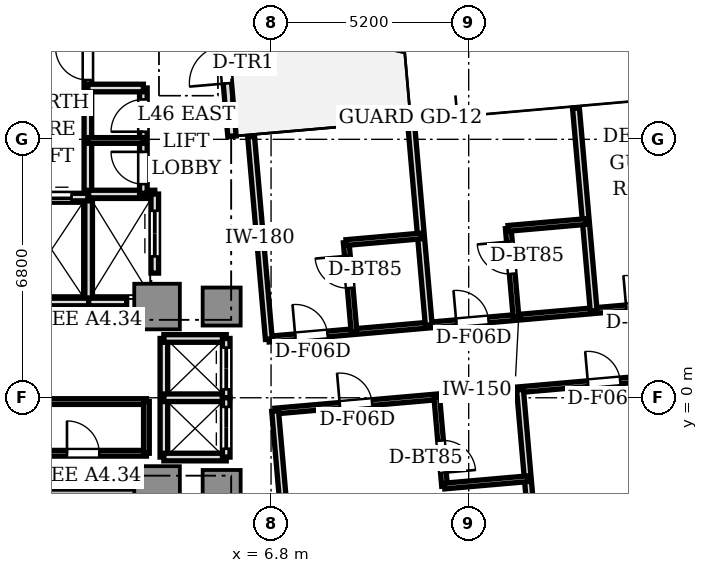
"""IFC4 building model, lengths in metres.
Left out: names, types, materials, properties, quantities, classifications, styles, units other than length and angle.
Written with IfcOpenShell. Run it as: python <this file> out.ifc"""

import sys

from ifc_helpers import new_model, si_unit, direction, frame, frame_2d, origin, origin_2d, place, context, subcontext, project, spatial, rectangle, extrude, source, transform, mapped, element, fill, save


model = new_model("IFC4")
c1 = context("Model", 3, precision=1e-05, world=origin(), true_north=direction((0.0, 1.0)))
c2 = subcontext(c1, "Body", "Model", "MODEL_VIEW")
j1 = project(units=[si_unit("LENGTHUNIT", "METRE"), si_unit("PLANEANGLEUNIT", "RADIAN")], contexts=[c1])
p1 = place(None, origin())
s1 = spatial("IfcSite", under=j1, at=p1, CompositionType="ELEMENT")
p2 = place(p1, origin())
s2 = spatial("IfcBuilding", under=s1, at=p2, CompositionType="ELEMENT")
p3 = place(p2, frame((0.0, 0.0, 167.35)))
s3 = spatial("IfcBuildingStorey", under=s2, at=p3, CompositionType="ELEMENT", Elevation=167.35)
m1 = source(origin(), c2, "Body", "SweptSolid", [
    extrude(rectangle(XDim=1.2, YDim=1.2, at=origin_2d()), origin(), (0.0, 0.0, 1.0), 3.05),
])
for number, where, z_axis, x_axis in (
    (1, (3.8, 2.4, 0.0), (0.0, 0.0, 1.0), (1.0, 0.0, 0.0)),
    (2, (3.8, -2.4, 0.0), (0.0, 0.0, 1.0), (1.0, 0.0, 0.0)),
):
    element("IfcColumn", number, at=place(p3, frame(where, z_axis=z_axis, x_axis=x_axis)), inside=s3, PredefinedType="COLUMN", context=c2, shape_type="MappedRepresentation", body=[
        mapped(m1, transform((0.0, 0.0, 0.0), scale=1.0)),
    ])
m2 = source(origin(), c2, "Body", "SweptSolid", [
    extrude(rectangle(XDim=1.0, YDim=1.0, at=origin_2d()), origin(), (0.0, 0.0, 1.0), 3.05),
])
for number, where, z_axis, x_axis in (
    (3, (5.5, 2.4, 0.0), (0.0, 0.0, 1.0), (1.0, 0.0, 0.0)),
    (4, (5.5, -2.4, 0.0), (0.0, 0.0, 1.0), (1.0, 0.0, 0.0)),
):
    element("IfcColumn", number, at=place(p3, frame(where, z_axis=z_axis, x_axis=x_axis)), inside=s3, PredefinedType="COLUMN", context=c2, shape_type="MappedRepresentation", body=[
        mapped(m2, transform((0.0, 0.0, 0.0), scale=1.0)),
    ])
p4 = place(p3, frame((5.772, 6.879, 0.0), z_axis=(0.0, 0.0, 1.0), x_axis=(-0.087168071984, 0.996193619346, 0.0)))
e5 = element("IfcWall", 5, at=p4, inside=s3, PredefinedType="STANDARD", context=c2, shape_type="SweptSolid", body=[
    extrude(rectangle(XDim=2.7, YDim=0.22, at=frame_2d((1.35, 0.0))), origin(), (0.0, 0.0, 1.0), 3.05),
])
p5 = place(p4, frame((1.4, 0.0, 0.0)))
e6 = element("IfcOpeningElement", 6, at=p5, cuts=e5, PredefinedType="OPENING", context=c2, shape_type="SweptSolid", body=[
    extrude(rectangle(XDim=1.0, YDim=2.2, at=frame_2d((0.5, 1.1))), frame((0.0, 0.12, 0.0), z_axis=(0.0, -1.0, 0.0), x_axis=(1.0, 0.0, 0.0)), (0.0, 0.0, 1.0), 0.24),
])
p6 = place(p3, frame((0.0, -2.5, 0.0), z_axis=(0.0, 0.0, 1.0), x_axis=(1.0, 0.0, 0.0)))
e7 = element("IfcWall", 7, at=p6, inside=s3, PredefinedType="SOLIDWALL", context=c2, shape_type="SweptSolid", body=[
    extrude(rectangle(XDim=3.72, YDim=0.2, at=frame_2d((1.86, 0.0))), origin(), (0.0, 0.0, 1.0), 3.05),
])
p7 = place(p3, frame((1.98, 5.32, 0.0), z_axis=(0.0, 0.0, 1.0), x_axis=(0.0, 1.0, 0.0)))
e8 = element("IfcWall", 8, at=p7, inside=s3, PredefinedType="SOLIDWALL", context=c2, shape_type="SweptSolid", body=[
    extrude(rectangle(XDim=4.66, YDim=0.2, at=frame_2d((2.33, 0.0))), origin(), (0.0, 0.0, 1.0), 2.6),
])
p8 = place(p7, frame((3.04, 0.0, 0.0)))
e9 = element("IfcOpeningElement", 9, at=p8, cuts=e8, PredefinedType="OPENING", context=c2, shape_type="SweptSolid", body=[
    extrude(rectangle(XDim=0.85, YDim=2.1, at=frame_2d((0.425, 1.05))), frame((0.0, 0.11, 0.0), z_axis=(0.0, -1.0, 0.0), x_axis=(1.0, 0.0, 0.0)), (0.0, 0.0, 1.0), 0.22),
])
p9 = place(p3, frame((2.0, 2.5, 0.0), z_axis=(0.0, 0.0, 1.0), x_axis=(0.0, 1.0, 0.0)))
e10 = element("IfcWall", 10, at=p9, inside=s3, PredefinedType="SOLIDWALL", context=c2, shape_type="SweptSolid", body=[
    extrude(rectangle(XDim=2.78, YDim=0.2, at=frame_2d((1.39, 0.0))), origin(), (0.0, 0.0, 1.0), 2.6),
])
p10 = place(p3, frame((0.05, 2.52, 0.0), z_axis=(0.0, 0.0, 1.0), x_axis=(1.0, 0.0, 0.0)))
e11 = element("IfcWall", 11, at=p10, inside=s3, PredefinedType="SOLIDWALL", context=c2, shape_type="SweptSolid", body=[
    extrude(rectangle(XDim=1.95, YDim=0.2, at=frame_2d((0.975, 0.0))), origin(), (0.0, 0.0, 1.0), 2.6),
])
p11 = place(p3, frame((0.05, 5.28, 0.0), z_axis=(0.0, 0.0, 1.0), x_axis=(1.0, 0.0, 0.0)))
e12 = element("IfcWall", 12, at=p11, inside=s3, PredefinedType="SOLIDWALL", context=c2, shape_type="SweptSolid", body=[
    extrude(rectangle(XDim=1.93, YDim=0.2, at=frame_2d((0.965, 0.0))), origin(), (0.0, 0.0, 1.0), 2.6),
])
p12 = place(p11, frame((0.4, 0.0, 0.0)))
e13 = element("IfcOpeningElement", 13, at=p12, cuts=e12, PredefinedType="OPENING", context=c2, shape_type="SweptSolid", body=[
    extrude(rectangle(XDim=1.1, YDim=2.2, at=frame_2d((0.55, 1.1))), frame((0.0, 0.11, 0.0), z_axis=(0.0, -1.0, 0.0), x_axis=(1.0, 0.0, 0.0)), (0.0, 0.0, 1.0), 0.22),
])
p13 = place(p3, frame((2.0, 2.52, 0.0), z_axis=(0.0, 0.0, 1.0), x_axis=(1.0, 0.0, 0.0)))
e14 = element("IfcWall", 14, at=p13, inside=s3, PredefinedType="SOLIDWALL", context=c2, shape_type="SweptSolid", body=[
    extrude(rectangle(XDim=1.0, YDim=0.2, at=frame_2d((0.5, 0.0))), origin(), (0.0, 0.0, 1.0), 2.6),
])
p14 = place(p3, frame((2.0, 5.36, 0.0), z_axis=(0.0, 0.0, 1.0), x_axis=(1.0, 0.0, 0.0)))
e15 = element("IfcWall", 15, at=p14, inside=s3, PredefinedType="SOLIDWALL", context=c2, shape_type="SweptSolid", body=[
    extrude(rectangle(XDim=1.74, YDim=0.2, at=frame_2d((0.87, 0.0))), origin(), (0.0, 0.0, 1.0), 2.6),
])
p15 = place(p3, frame((3.74, 3.28, 0.0), z_axis=(0.0, 0.0, 1.0), x_axis=(0.0, 1.0, 0.0)))
e16 = element("IfcWall", 16, at=p15, inside=s3, PredefinedType="SOLIDWALL", context=c2, shape_type="SweptSolid", body=[
    extrude(rectangle(XDim=2.08, YDim=0.2, at=frame_2d((1.04, 0.0))), origin(), (0.0, 0.0, 1.0), 2.6),
])
p16 = place(p15, frame((0.44, 0.0, 0.0)))
e17 = element("IfcOpeningElement", 17, at=p16, cuts=e16, PredefinedType="OPENING", context=c2, shape_type="SweptSolid", body=[
    extrude(rectangle(XDim=1.2, YDim=2.2, at=frame_2d((0.6, 1.1))), frame((0.0, 0.11, 0.0), z_axis=(0.0, -1.0, 0.0), x_axis=(1.0, 0.0, 0.0)), (0.0, 0.0, 1.0), 0.22),
])
p17 = place(p3, frame((3.98, -1.56, 0.0), z_axis=(0.0, 0.0, 1.0), x_axis=(0.0, 1.0, 0.0)))
e18 = element("IfcWall", 18, at=p17, inside=s3, PredefinedType="SOLIDWALL", context=c2, shape_type="SweptSolid", body=[
    extrude(rectangle(XDim=3.12, YDim=0.2, at=frame_2d((1.56, 0.0))), origin(), (0.0, 0.0, 1.0), 2.22),
])
for number, where, z_axis, x_axis in (
    (19, (3.98, 1.56, 0.0), (0.0, 0.0, 1.0), (1.0, 0.0, 0.0)),
    (20, (3.98, -1.56, 0.0), (0.0, 0.0, 1.0), (1.0, 0.0, 0.0)),
    (21, (3.98, 0.0, 0.0), (0.0, 0.0, 1.0), (1.0, 0.0, 0.0)),
):
    element("IfcWall", number, at=place(p3, frame(where, z_axis=z_axis, x_axis=x_axis)), inside=s3, PredefinedType="SOLIDWALL", context=c2, shape_type="SweptSolid", body=[
        extrude(rectangle(XDim=1.64, YDim=0.2, at=frame_2d((0.82, 0.0))), origin(), (0.0, 0.0, 1.0), 2.6),
    ])
p18 = place(p3, frame((5.62, 0.0, 0.0), z_axis=(0.0, 0.0, 1.0), x_axis=(0.0, 1.0, 0.0)))
e22 = element("IfcWall", 22, at=p18, inside=s3, PredefinedType="SOLIDWALL", context=c2, shape_type="SweptSolid", body=[
    extrude(rectangle(XDim=1.56, YDim=0.2, at=frame_2d((0.78, 0.0))), origin(), (0.0, 0.0, 1.0), 2.6),
])
p19 = place(p18, frame((0.22, 0.0, 0.0)))
e23 = element("IfcOpeningElement", 23, at=p19, cuts=e22, PredefinedType="OPENING", context=c2, shape_type="SweptSolid", body=[
    extrude(rectangle(XDim=1.1, YDim=2.2, at=frame_2d((0.55, 1.1))), frame((0.0, 0.11, 0.0), z_axis=(0.0, -1.0, 0.0), x_axis=(1.0, 0.0, 0.0)), (0.0, 0.0, 1.0), 0.22),
])
p20 = place(p3, frame((5.62, -1.56, 0.0), z_axis=(0.0, 0.0, 1.0), x_axis=(0.0, 1.0, 0.0)))
e24 = element("IfcWall", 24, at=p20, inside=s3, PredefinedType="SOLIDWALL", context=c2, shape_type="SweptSolid", body=[
    extrude(rectangle(XDim=1.56, YDim=0.2, at=frame_2d((0.78, 0.0))), origin(), (0.0, 0.0, 1.0), 2.6),
])
p21 = place(p20, frame((0.22, 0.0, 0.0)))
e25 = element("IfcOpeningElement", 25, at=p21, cuts=e24, PredefinedType="OPENING", context=c2, shape_type="SweptSolid", body=[
    extrude(rectangle(XDim=1.1, YDim=2.2, at=frame_2d((0.55, 1.1))), frame((0.0, 0.11, 0.0), z_axis=(0.0, -1.0, 0.0), x_axis=(1.0, 0.0, 0.0)), (0.0, 0.0, 1.0), 0.22),
])
p22 = place(p3, frame((3.44, 5.38, 0.0), z_axis=(0.0, 0.0, 1.0), x_axis=(0.0, 1.0, 0.0)))
e26 = element("IfcWall", 26, at=p22, inside=s3, PredefinedType="SOLIDWALL", context=c2, shape_type="SweptSolid", body=[
    extrude(rectangle(XDim=2.77, YDim=0.2, at=frame_2d((1.385, 0.0))), origin(), (0.0, 0.0, 1.0), 2.6),
])
p23 = place(p22, frame((0.24, 0.0, 0.0)))
e27 = element("IfcOpeningElement", 27, at=p23, cuts=e26, PredefinedType="OPENING", context=c2, shape_type="SweptSolid", body=[
    extrude(rectangle(XDim=0.85, YDim=2.1, at=frame_2d((0.425, 1.05))), frame((0.0, 0.11, 0.0), z_axis=(0.0, -1.0, 0.0), x_axis=(1.0, 0.0, 0.0)), (0.0, 0.0, 1.0), 0.22),
])
p24 = place(p22, frame((1.62, 0.0, 0.0)))
e28 = element("IfcOpeningElement", 28, at=p24, cuts=e26, PredefinedType="OPENING", context=c2, shape_type="SweptSolid", body=[
    extrude(rectangle(XDim=0.85, YDim=2.1, at=frame_2d((0.425, 1.05))), frame((0.0, 0.11, 0.0), z_axis=(0.0, -1.0, 0.0), x_axis=(1.0, 0.0, 0.0)), (0.0, 0.0, 1.0), 0.22),
])
p25 = place(p3, frame((1.98, 8.15, 0.0), z_axis=(0.0, 0.0, 1.0), x_axis=(1.0, 0.0, 0.0)))
e29 = element("IfcWall", 29, at=p25, inside=s3, PredefinedType="SOLIDWALL", context=c2, shape_type="SweptSolid", body=[
    extrude(rectangle(XDim=1.46, YDim=0.2, at=frame_2d((0.73, 0.0))), origin(), (0.0, 0.0, 1.0), 2.6),
])
p26 = place(p3, frame((1.98, 6.77, 0.0), z_axis=(0.0, 0.0, 1.0), x_axis=(1.0, 0.0, 0.0)))
e30 = element("IfcWall", 30, at=p26, inside=s3, PredefinedType="PARTITIONING", context=c2, shape_type="SweptSolid", body=[
    extrude(rectangle(XDim=1.46, YDim=0.15, at=frame_2d((0.73, 0.0))), origin(), (0.0, 0.0, 1.0), 2.6),
])
p27 = place(p3, frame((0.38, -0.1, 0.0), z_axis=(0.0, 0.0, 1.0), x_axis=(1.0, 0.0, 0.0)))
e31 = element("IfcWall", 31, at=p27, inside=s3, PredefinedType="PARTITIONING", context=c2, shape_type="SweptSolid", body=[
    extrude(rectangle(XDim=3.14, YDim=0.15, at=frame_2d((1.57, 0.0))), origin(), (0.0, 0.0, 1.0), 2.6),
])
p28 = place(p3, frame((0.38, -1.46, 0.0), z_axis=(0.0, 0.0, 1.0), x_axis=(1.0, 0.0, 0.0)))
e32 = element("IfcWall", 32, at=p28, inside=s3, PredefinedType="PARTITIONING", context=c2, shape_type="SweptSolid", body=[
    extrude(rectangle(XDim=3.14, YDim=0.15, at=frame_2d((1.57, 0.0))), origin(), (0.0, 0.0, 1.0), 2.6),
])
p29 = place(p28, frame((1.05, 0.0, 0.0)))
e33 = element("IfcOpeningElement", 33, at=p29, cuts=e32, PredefinedType="OPENING", context=c2, shape_type="SweptSolid", body=[
    extrude(rectangle(XDim=0.85, YDim=2.1, at=frame_2d((0.425, 1.05))), frame((0.0, 0.085, 0.0), z_axis=(0.0, -1.0, 0.0), x_axis=(1.0, 0.0, 0.0)), (0.0, 0.0, 1.0), 0.17),
])
p30 = place(p3, frame((3.52, -1.46, 0.0), z_axis=(0.0, 0.0, 1.0), x_axis=(0.0, 1.0, 0.0)))
e34 = element("IfcWall", 34, at=p30, inside=s3, PredefinedType="PARTITIONING", context=c2, shape_type="SweptSolid", body=[
    extrude(rectangle(XDim=1.36, YDim=0.15, at=frame_2d((0.68, 0.0))), origin(), (0.0, 0.0, 1.0), 2.22),
])
p31 = place(p3, frame((6.741, 1.543, 0.0), z_axis=(0.0, 0.0, 1.0), x_axis=(0.996195062465, 0.087151577845, 0.0)))
e35 = element("IfcWall", 35, at=p31, inside=s3, PredefinedType="PARTITIONING", context=c2, shape_type="SweptSolid", body=[
    extrude(rectangle(XDim=13.2, YDim=0.15, at=frame_2d((6.6, 0.0))), origin(), (0.0, 0.0, 1.0), 2.6),
])
p32 = place(p31, frame((0.7, 0.0, 0.0)))
e36 = element("IfcOpeningElement", 36, at=p32, cuts=e35, PredefinedType="OPENING", context=c2, shape_type="SweptSolid", body=[
    extrude(rectangle(XDim=0.85, YDim=2.1, at=frame_2d((0.425, 1.05))), frame((0.0, 0.085, 0.0), z_axis=(0.0, -1.0, 0.0), x_axis=(1.0, 0.0, 0.0)), (0.0, 0.0, 1.0), 0.17),
])
p33 = place(p31, frame((4.952, 0.0, 0.0)))
e37 = element("IfcOpeningElement", 37, at=p33, cuts=e35, PredefinedType="OPENING", context=c2, shape_type="SweptSolid", body=[
    extrude(rectangle(XDim=0.85, YDim=2.1, at=frame_2d((0.425, 1.05))), frame((0.0, 0.085, 0.0), z_axis=(0.0, -1.0, 0.0), x_axis=(1.0, 0.0, 0.0)), (0.0, 0.0, 1.0), 0.17),
])
p34 = place(p31, frame((9.44, 0.0, 0.0)))
e38 = element("IfcOpeningElement", 38, at=p34, cuts=e35, PredefinedType="OPENING", context=c2, shape_type="SweptSolid", body=[
    extrude(rectangle(XDim=0.85, YDim=2.1, at=frame_2d((0.425, 1.05))), frame((0.0, 0.085, 0.0), z_axis=(0.0, -1.0, 0.0), x_axis=(1.0, 0.0, 0.0)), (0.0, 0.0, 1.0), 0.17),
])
p35 = place(p3, frame((6.907, -0.349, 0.0), z_axis=(0.0, 0.0, 1.0), x_axis=(0.996195062465, 0.087151577845, 0.0)))
e39 = element("IfcWall", 39, at=p35, inside=s3, PredefinedType="PARTITIONING", context=c2, shape_type="SweptSolid", body=[
    extrude(rectangle(XDim=13.2, YDim=0.15, at=frame_2d((6.6, 0.0))), origin(), (0.0, 0.0, 1.0), 2.6),
])
p36 = place(p35, frame((1.71, 0.0, 0.0)))
e40 = element("IfcOpeningElement", 40, at=p36, cuts=e39, PredefinedType="OPENING", context=c2, shape_type="SweptSolid", body=[
    extrude(rectangle(XDim=0.85, YDim=2.1, at=frame_2d((0.425, 1.05))), frame((0.0, 0.085, 0.0), z_axis=(0.0, -1.0, 0.0), x_axis=(1.0, 0.0, 0.0)), (0.0, 0.0, 1.0), 0.17),
])
p37 = place(p35, frame((8.264, 0.0, 0.0)))
e41 = element("IfcOpeningElement", 41, at=p37, cuts=e39, PredefinedType="OPENING", context=c2, shape_type="SweptSolid", body=[
    extrude(rectangle(XDim=0.85, YDim=2.1, at=frame_2d((0.425, 1.05))), frame((0.0, 0.085, 0.0), z_axis=(0.0, -1.0, 0.0), x_axis=(1.0, 0.0, 0.0)), (0.0, 0.0, 1.0), 0.17),
])
for number, where, z_axis, x_axis in (
    (42, (6.741, 1.543, 0.0), (0.0, 0.0, 1.0), (-0.087, 0.996, 0.0)),
    (43, (7.373, -5.679, 0.0), (0.0, 0.0, 1.0), (-0.087, 0.996, 0.0)),
    (44, (10.949, 1.912, 0.0), (0.0, 0.0, 1.0), (-0.087, 0.996, 0.0)),
):
    element("IfcWall", number, at=place(p3, frame(where, z_axis=z_axis, x_axis=x_axis)), inside=s3, PredefinedType="PARTITIONING", context=c2, shape_type="SweptSolid", body=[
        extrude(rectangle(XDim=5.35, YDim=0.18, at=frame_2d((2.675, 0.0))), origin(), (0.0, 0.0, 1.0), 2.6),
    ])
p38 = place(p3, frame((8.983, 1.74, 0.0), z_axis=(0.0, 0.0, 1.0), x_axis=(-0.087224846905, 0.996188649846, 0.0)))
e45 = element("IfcWall", 45, at=p38, inside=s3, PredefinedType="PARTITIONING", context=c2, shape_type="SweptSolid", body=[
    extrude(rectangle(XDim=2.354, YDim=0.15, at=frame_2d((1.177, 0.0))), origin(), (0.0, 0.0, 1.0), 2.6),
])
p39 = place(p38, frame((1.154, 0.0, 0.0)))
e46 = element("IfcOpeningElement", 46, at=p39, cuts=e45, PredefinedType="OPENING", context=c2, shape_type="SweptSolid", body=[
    extrude(rectangle(XDim=0.85, YDim=2.1, at=frame_2d((0.425, 1.05))), frame((0.0, 0.085, 0.0), z_axis=(0.0, -1.0, 0.0), x_axis=(1.0, 0.0, 0.0)), (0.0, 0.0, 1.0), 0.17),
])
p40 = place(p3, frame((8.777, 4.084, 0.0), z_axis=(0.0, 0.0, 1.0), x_axis=(0.996191703625, 0.087189962887, 0.0)))
e47 = element("IfcWall", 47, at=p40, inside=s3, PredefinedType="PARTITIONING", context=c2, shape_type="SweptSolid", body=[
    extrude(rectangle(XDim=1.974, YDim=0.15, at=frame_2d((0.987, 0.0))), origin(), (0.0, 0.0, 1.0), 2.6),
])
p41 = place(p3, frame((15.289, 2.291, 0.0), z_axis=(0.0, 0.0, 1.0), x_axis=(-0.087161289348, 0.996194212812, 0.0)))
e48 = element("IfcWall", 48, at=p41, inside=s3, PredefinedType="PARTITIONING", context=c2, shape_type="SweptSolid", body=[
    extrude(rectangle(XDim=5.35, YDim=0.18, at=frame_2d((2.675, 0.0))), origin(), (0.0, 0.0, 1.0), 2.6),
])
p42 = place(p3, frame((13.246, 2.113, 0.0), z_axis=(0.0, 0.0, 1.0), x_axis=(-0.087224846905, 0.996188649846, 0.0)))
e49 = element("IfcWall", 49, at=p42, inside=s3, PredefinedType="PARTITIONING", context=c2, shape_type="SweptSolid", body=[
    extrude(rectangle(XDim=2.354, YDim=0.15, at=frame_2d((1.177, 0.0))), origin(), (0.0, 0.0, 1.0), 2.6),
])
p43 = place(p42, frame((1.154, 0.0, 0.0)))
e50 = element("IfcOpeningElement", 50, at=p43, cuts=e49, PredefinedType="OPENING", context=c2, shape_type="SweptSolid", body=[
    extrude(rectangle(XDim=0.85, YDim=2.1, at=frame_2d((0.425, 1.05))), frame((0.0, 0.085, 0.0), z_axis=(0.0, -1.0, 0.0), x_axis=(1.0, 0.0, 0.0)), (0.0, 0.0, 1.0), 0.17),
])
p44 = place(p3, frame((13.041, 4.458, 0.0), z_axis=(0.0, 0.0, 1.0), x_axis=(0.99619307114, 0.087174336889, 0.0)))
e51 = element("IfcWall", 51, at=p44, inside=s3, PredefinedType="PARTITIONING", context=c2, shape_type="SweptSolid", body=[
    extrude(rectangle(XDim=2.05, YDim=0.15, at=frame_2d((1.025, 0.0))), origin(), (0.0, 0.0, 1.0), 2.6),
])
p45 = place(p3, frame((13.35, 0.214, 0.0), z_axis=(0.0, 0.0, 1.0), x_axis=(0.087161289348, -0.996194212812, 0.0)))
e52 = element("IfcWall", 52, at=p45, inside=s3, PredefinedType="PARTITIONING", context=c2, shape_type="SweptSolid", body=[
    extrude(rectangle(XDim=5.35, YDim=0.18, at=frame_2d((2.675, 0.0))), origin(), (0.0, 0.0, 1.0), 2.6),
])
p46 = place(p3, frame((11.159, 0.023, 0.0), z_axis=(0.0, 0.0, 1.0), x_axis=(0.087224846905, -0.996188649846, 0.0)))
e53 = element("IfcWall", 53, at=p46, inside=s3, PredefinedType="PARTITIONING", context=c2, shape_type="SweptSolid", body=[
    extrude(rectangle(XDim=2.354, YDim=0.15, at=frame_2d((1.177, 0.0))), origin(), (0.0, 0.0, 1.0), 2.6),
])
p47 = place(p46, frame((1.154, 0.0, 0.0)))
e54 = element("IfcOpeningElement", 54, at=p47, cuts=e53, PredefinedType="OPENING", context=c2, shape_type="SweptSolid", body=[
    extrude(rectangle(XDim=0.85, YDim=2.1, at=frame_2d((0.425, 1.05))), frame((0.0, 0.085, 0.0), z_axis=(0.0, -1.0, 0.0), x_axis=(1.0, 0.0, 0.0)), (0.0, 0.0, 1.0), 0.17),
])
p48 = place(p3, frame((11.365, -2.322, 0.0), z_axis=(0.0, 0.0, 1.0), x_axis=(0.996195042958, 0.087151800816, 0.0)))
e55 = element("IfcWall", 55, at=p48, inside=s3, PredefinedType="PARTITIONING", context=c2, shape_type="SweptSolid", body=[
    extrude(rectangle(XDim=2.199, YDim=0.15, at=frame_2d((1.1, 0.0))), origin(), (0.0, 0.0, 1.0), 2.6),
])
m3 = source(origin(), c2, "Body", "SweptSolid", [
    extrude(rectangle(XDim=1.0, YDim=0.05, at=origin_2d()), origin(), (0.0, 0.0, 1.0), 2.2),
])
p49 = place(p5, frame((0.5, 0.0, 0.0)))
e56 = element("IfcDoor", 56, at=p49, inside=s3, OperationType="SINGLE_SWING_LEFT", PredefinedType="DOOR", context=c2, shape_type="MappedRepresentation", body=[
    mapped(m3, transform((0.0, 0.0, 0.0), scale=1.0)),
])
fill(e6, e56)
m4 = source(origin(), c2, "Body", "SweptSolid", [
    extrude(rectangle(XDim=0.85, YDim=0.05, at=origin_2d()), origin(), (0.0, 0.0, 1.0), 2.1),
])
p50 = place(p8, frame((0.425, 0.0, 0.0)))
e57 = element("IfcDoor", 57, at=p50, inside=s3, OperationType="SINGLE_SWING_RIGHT", PredefinedType="DOOR", context=c2, shape_type="MappedRepresentation", body=[
    mapped(m4, transform((0.0, 0.0, 0.0), scale=1.0)),
])
fill(e9, e57)
m5 = source(origin(), c2, "Body", "SweptSolid", [
    extrude(rectangle(XDim=1.1, YDim=0.05, at=origin_2d()), origin(), (0.0, 0.0, 1.0), 2.2),
])
p51 = place(p12, frame((0.55, 0.0, 0.0)))
e58 = element("IfcDoor", 58, at=p51, inside=s3, OperationType="DOUBLE_DOOR_SLIDING", PredefinedType="DOOR", context=c2, shape_type="MappedRepresentation", body=[
    mapped(m5, transform((0.0, 0.0, 0.0), scale=1.0)),
])
fill(e13, e58)
m6 = source(origin(), c2, "Body", "SweptSolid", [
    extrude(rectangle(XDim=1.2, YDim=0.05, at=origin_2d()), origin(), (0.0, 0.0, 1.0), 2.2),
])
p52 = place(p16, frame((0.6, 0.0, 0.0)))
e59 = element("IfcDoor", 59, at=p52, inside=s3, OperationType="DOUBLE_DOOR_SLIDING", PredefinedType="DOOR", context=c2, shape_type="MappedRepresentation", body=[
    mapped(m6, transform((0.0, 0.0, 0.0), scale=1.0)),
])
fill(e17, e59)
p53 = place(p19, frame((0.55, 0.0, 0.0)))
e60 = element("IfcDoor", 60, at=p53, inside=s3, OperationType="DOUBLE_DOOR_SLIDING", PredefinedType="DOOR", context=c2, shape_type="MappedRepresentation", body=[
    mapped(m5, transform((0.0, 0.0, 0.0), scale=1.0)),
])
fill(e23, e60)
p54 = place(p21, frame((0.55, 0.0, 0.0)))
e61 = element("IfcDoor", 61, at=p54, inside=s3, OperationType="DOUBLE_DOOR_SLIDING", PredefinedType="DOOR", context=c2, shape_type="MappedRepresentation", body=[
    mapped(m5, transform((0.0, 0.0, 0.0), scale=1.0)),
])
fill(e25, e61)
p55 = place(p23, frame((0.425, 0.0, 0.0)))
e62 = element("IfcDoor", 62, at=p55, inside=s3, OperationType="SINGLE_SWING_RIGHT", PredefinedType="DOOR", context=c2, shape_type="MappedRepresentation", body=[
    mapped(m4, transform((0.0, 0.0, 0.0), scale=1.0)),
])
fill(e27, e62)
p56 = place(p24, frame((0.425, 0.0, 0.0)))
e63 = element("IfcDoor", 63, at=p56, inside=s3, OperationType="SINGLE_SWING_LEFT", PredefinedType="DOOR", context=c2, shape_type="MappedRepresentation", body=[
    mapped(m4, transform((0.0, 0.0, 0.0), scale=1.0)),
])
fill(e28, e63)
p57 = place(p29, frame((0.425, 0.0, 0.0)))
e64 = element("IfcDoor", 64, at=p57, inside=s3, OperationType="SINGLE_SWING_LEFT", PredefinedType="DOOR", context=c2, shape_type="MappedRepresentation", body=[
    mapped(m4, transform((0.0, 0.0, 0.0), scale=1.0)),
])
fill(e33, e64)
p58 = place(p39, frame((0.425, 0.0, 0.0)))
e65 = element("IfcDoor", 65, at=p58, inside=s3, OperationType="SINGLE_SWING_RIGHT", PredefinedType="DOOR", context=c2, shape_type="MappedRepresentation", body=[
    mapped(m4, transform((0.0, 0.0, 0.0), scale=1.0)),
])
fill(e46, e65)
p59 = place(p32, frame((0.425, 0.0, 0.0)))
e66 = element("IfcDoor", 66, at=p59, inside=s3, OperationType="SINGLE_SWING_LEFT", PredefinedType="DOOR", context=c2, shape_type="MappedRepresentation", body=[
    mapped(m4, transform((0.0, 0.0, 0.0), scale=1.0)),
])
fill(e36, e66)
p60 = place(p43, frame((0.425, 0.0, 0.0)))
e67 = element("IfcDoor", 67, at=p60, inside=s3, OperationType="SINGLE_SWING_RIGHT", PredefinedType="DOOR", context=c2, shape_type="MappedRepresentation", body=[
    mapped(m4, transform((0.0, 0.0, 0.0), scale=1.0)),
])
fill(e50, e67)
p61 = place(p33, frame((0.425, 0.0, 0.0)))
e68 = element("IfcDoor", 68, at=p61, inside=s3, OperationType="SINGLE_SWING_LEFT", PredefinedType="DOOR", context=c2, shape_type="MappedRepresentation", body=[
    mapped(m4, transform((0.0, 0.0, 0.0), scale=1.0)),
])
fill(e37, e68)
p62 = place(p34, frame((0.425, 0.0, 0.0)))
e69 = element("IfcDoor", 69, at=p62, inside=s3, OperationType="SINGLE_SWING_LEFT", PredefinedType="DOOR", context=c2, shape_type="MappedRepresentation", body=[
    mapped(m4, transform((0.0, 0.0, 0.0), scale=1.0)),
])
fill(e38, e69)
p63 = place(p47, frame((0.425, 0.0, 0.0)))
e70 = element("IfcDoor", 70, at=p63, inside=s3, OperationType="SINGLE_SWING_RIGHT", PredefinedType="DOOR", context=c2, shape_type="MappedRepresentation", body=[
    mapped(m4, transform((0.0, 0.0, 0.0), scale=1.0)),
])
fill(e54, e70)
p64 = place(p36, frame((0.425, 0.0, 0.0)))
e71 = element("IfcDoor", 71, at=p64, inside=s3, OperationType="SINGLE_SWING_LEFT", PredefinedType="DOOR", context=c2, shape_type="MappedRepresentation", body=[
    mapped(m4, transform((0.0, 0.0, 0.0), scale=1.0)),
])
fill(e40, e71)
p65 = place(p37, frame((0.425, 0.0, 0.0)))
e72 = element("IfcDoor", 72, at=p65, inside=s3, OperationType="SINGLE_SWING_LEFT", PredefinedType="DOOR", context=c2, shape_type="MappedRepresentation", body=[
    mapped(m4, transform((0.0, 0.0, 0.0), scale=1.0)),
])
fill(e41, e72)
save(model, sys.argv[1])
